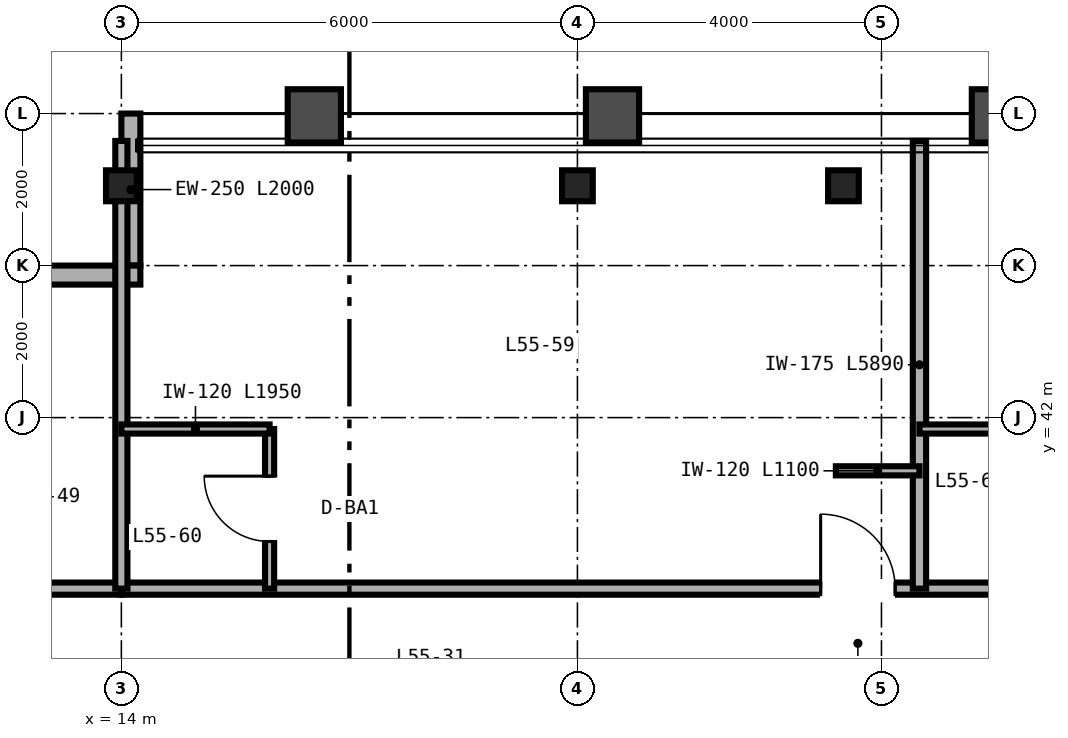
"""IFC4 building model, lengths in metres.
Left out: names, types, materials, properties, quantities, classifications, styles, units other than length and angle.
Written with IfcOpenShell. Run it as: python <this file> out.ifc"""

import sys

from ifc_helpers import new_model, si_unit, direction, frame, frame_2d, origin, origin_2d, place, context, subcontext, project, spatial, rectangle, i_section, extrude, source, transform, mapped, element, fill, save


model = new_model("IFC4")
c1 = context("Model", 3, precision=1e-05, world=origin(), true_north=direction((0.0, 1.0)))
c2 = subcontext(c1, "Body", "Model", "MODEL_VIEW")
j1 = project(units=[si_unit("LENGTHUNIT", "METRE"), si_unit("PLANEANGLEUNIT", "RADIAN")], contexts=[c1])
p1 = place(None, origin())
s1 = spatial("IfcSite", under=j1, at=p1, CompositionType="ELEMENT")
p2 = place(p1, origin())
s2 = spatial("IfcBuilding", under=s1, at=p2, CompositionType="ELEMENT")
p3 = place(p2, frame((0.0, 0.0, 217.2)))
s3 = spatial("IfcBuildingStorey", under=s2, at=p3, CompositionType="ELEMENT", Elevation=217.2)
m1 = source(origin(), c2, "Body", "SweptSolid", [
    extrude(i_section(OverallWidth=0.404, OverallDepth=0.407, WebThickness=0.027, FlangeThickness=0.044, FilletRadius=0.025, at=origin_2d()), origin(), (0.0, 0.0, 1.0), 3.28),
])
for number, where, z_axis, x_axis in (
    (1, (14.0, 45.05, 0.0), (0.0, 0.0, 1.0), (1.0, 0.0, 0.0)),
    (2, (20.0, 45.05, 0.0), (0.0, 0.0, 1.0), (1.0, 0.0, 0.0)),
    (3, (23.5, 45.05, 0.0), (0.0, 0.0, 1.0), (1.0, 0.0, 0.0)),
):
    element("IfcColumn", number, at=place(p3, frame(where, z_axis=z_axis, x_axis=x_axis)), inside=s3, PredefinedType="COLUMN", context=c2, shape_type="MappedRepresentation", body=[
        mapped(m1, transform((0.0, 0.0, 0.0), scale=1.0)),
    ])
p4 = place(p3, frame((14.125, 46.0, 0.0), z_axis=(0.0, 0.0, 1.0), x_axis=(0.0, -1.0, 0.0)))
e4 = element("IfcWall", 4, at=p4, inside=s3, PredefinedType="SOLIDWALL", context=c2, shape_type="SweptSolid", body=[
    extrude(rectangle(XDim=2.0, YDim=0.25, at=frame_2d((1.0, 0.0))), origin(), (0.0, 0.0, 1.0), 2.587),
])
p5 = place(p3, frame((14.25, 43.875, 0.0), z_axis=(0.0, 0.0, 1.0), x_axis=(-1.0, 0.0, 0.0)))
e5 = element("IfcWall", 5, at=p5, inside=s3, PredefinedType="SOLIDWALL", context=c2, shape_type="SweptSolid", body=[
    extrude(rectangle(XDim=2.0, YDim=0.25, at=frame_2d((1.0, 0.0))), origin(), (0.0, 0.0, 1.0), 3.28),
])
p6 = place(p3, frame((10.0, 39.75, 0.0), z_axis=(0.0, 0.0, 1.0), x_axis=(1.0, 0.0, 0.0)))
e6 = element("IfcWall", 6, at=p6, inside=s3, PredefinedType="PARTITIONING", context=c2, shape_type="SweptSolid", body=[
    extrude(rectangle(XDim=4.0, YDim=0.16, at=frame_2d((2.0, 0.0))), origin(), (0.0, 0.0, 1.0), 3.28),
])
p7 = place(p6, frame((1.52, 0.0, 0.0)))
e7 = element("IfcOpeningElement", 7, at=p7, cuts=e6, PredefinedType="OPENING", context=c2, shape_type="SweptSolid", body=[
    extrude(rectangle(XDim=0.96, YDim=2.15, at=frame_2d((0.48, 1.075))), frame((0.0, 0.09, 0.0), z_axis=(0.0, -1.0, 0.0), x_axis=(1.0, 0.0, 0.0)), (0.0, 0.0, 1.0), 0.18),
])
p8 = place(p3, frame((14.0, 39.75, 0.0), z_axis=(0.0, 0.0, 1.0), x_axis=(1.0, 0.0, 0.0)))
e8 = element("IfcWall", 8, at=p8, inside=s3, PredefinedType="PARTITIONING", context=c2, shape_type="SweptSolid", body=[
    extrude(rectangle(XDim=36.0, YDim=0.16, at=frame_2d((18.0, 0.0))), origin(), (0.0, 0.0, 1.0), 2.823),
])
p9 = place(p8, frame((9.2, 0.0, 0.0)))
e9 = element("IfcOpeningElement", 9, at=p9, cuts=e8, PredefinedType="OPENING", context=c2, shape_type="SweptSolid", body=[
    extrude(rectangle(XDim=0.98, YDim=2.2, at=frame_2d((0.49, 1.1))), frame((0.0, 0.09, 0.0), z_axis=(0.0, -1.0, 0.0), x_axis=(1.0, 0.0, 0.0)), (0.0, 0.0, 1.0), 0.18),
])
p10 = place(p8, frame((19.2, 0.0, 0.0)))
e10 = element("IfcOpeningElement", 10, at=p10, cuts=e8, PredefinedType="OPENING", context=c2, shape_type="SweptSolid", body=[
    extrude(rectangle(XDim=0.98, YDim=2.2, at=frame_2d((0.49, 1.1))), frame((0.0, 0.09, 0.0), z_axis=(0.0, -1.0, 0.0), x_axis=(1.0, 0.0, 0.0)), (0.0, 0.0, 1.0), 0.18),
])
p11 = place(p8, frame((24.52, 0.0, 0.0)))
e11 = element("IfcOpeningElement", 11, at=p11, cuts=e8, PredefinedType="OPENING", context=c2, shape_type="SweptSolid", body=[
    extrude(rectangle(XDim=0.96, YDim=2.15, at=frame_2d((0.48, 1.075))), frame((0.0, 0.09, 0.0), z_axis=(0.0, -1.0, 0.0), x_axis=(1.0, 0.0, 0.0)), (0.0, 0.0, 1.0), 0.18),
])
p12 = place(p8, frame((34.74, 0.0, 0.0)))
e12 = element("IfcOpeningElement", 12, at=p12, cuts=e8, PredefinedType="OPENING", context=c2, shape_type="SweptSolid", body=[
    extrude(rectangle(XDim=0.94, YDim=2.15, at=frame_2d((0.47, 1.075))), frame((0.0, 0.09, 0.0), z_axis=(0.0, -1.0, 0.0), x_axis=(1.0, 0.0, 0.0)), (0.0, 0.0, 1.0), 0.18),
])
p13 = place(p3, frame((14.0, 39.75, 0.0), z_axis=(0.0, 0.0, 1.0), x_axis=(0.0, 1.0, 0.0)))
e13 = element("IfcWall", 13, at=p13, inside=s3, PredefinedType="PARTITIONING", context=c2, shape_type="SweptSolid", body=[
    extrude(rectangle(XDim=5.89, YDim=0.16, at=frame_2d((2.945, 0.0))), origin(), (0.0, 0.0, 1.0), 2.587),
])
p14 = place(p3, frame((24.5, 39.75, 0.0), z_axis=(0.0, 0.0, 1.0), x_axis=(0.0, 1.0, 0.0)))
e14 = element("IfcWall", 14, at=p14, inside=s3, PredefinedType="PARTITIONING", context=c2, shape_type="SweptSolid", body=[
    extrude(rectangle(XDim=5.89, YDim=0.175, at=frame_2d((2.945, 0.0))), origin(), (0.0, 0.0, 1.0), 2.36),
])
p15 = place(p3, frame((15.95, 39.75, 0.0), z_axis=(0.0, 0.0, 1.0), x_axis=(0.0, 1.0, 0.0)))
e15 = element("IfcWall", 15, at=p15, inside=s3, PredefinedType="PARTITIONING", context=c2, shape_type="SweptSolid", body=[
    extrude(rectangle(XDim=2.1, YDim=0.12, at=frame_2d((1.05, 0.0))), origin(), (0.0, 0.0, 1.0), 3.28),
])
p16 = place(p15, frame((0.62, 0.0, 0.0)))
e16 = element("IfcOpeningElement", 16, at=p16, cuts=e15, PredefinedType="OPENING", context=c2, shape_type="SweptSolid", body=[
    extrude(rectangle(XDim=0.86, YDim=2.1, at=frame_2d((0.43, 1.05))), frame((0.0, 0.07, 0.0), z_axis=(0.0, -1.0, 0.0), x_axis=(1.0, 0.0, 0.0)), (0.0, 0.0, 1.0), 0.14),
])
p17 = place(p3, frame((14.0, 41.85, 0.0), z_axis=(0.0, 0.0, 1.0), x_axis=(1.0, 0.0, 0.0)))
e17 = element("IfcWall", 17, at=p17, inside=s3, PredefinedType="PARTITIONING", context=c2, shape_type="SweptSolid", body=[
    extrude(rectangle(XDim=1.95, YDim=0.12, at=frame_2d((0.975, 0.0))), origin(), (0.0, 0.0, 1.0), 3.28),
])
p18 = place(p3, frame((23.4, 41.3, 0.0), z_axis=(0.0, 0.0, 1.0), x_axis=(1.0, 0.0, 0.0)))
e18 = element("IfcWall", 18, at=p18, inside=s3, PredefinedType="PARTITIONING", context=c2, shape_type="SweptSolid", body=[
    extrude(rectangle(XDim=1.1, YDim=0.12, at=frame_2d((0.55, 0.0))), origin(), (0.0, 0.0, 1.0), 2.823),
])
p19 = place(p3, frame((24.5, 41.85, 0.0), z_axis=(0.0, 0.0, 1.0), x_axis=(1.0, 0.0, 0.0)))
e19 = element("IfcWall", 19, at=p19, inside=s3, PredefinedType="PARTITIONING", context=c2, shape_type="SweptSolid", body=[
    extrude(rectangle(XDim=1.95, YDim=0.12, at=frame_2d((0.975, 0.0))), origin(), (0.0, 0.0, 1.0), 3.28),
])
m2 = source(origin(), c2, "Body", "SweptSolid", [
    extrude(rectangle(XDim=0.86, YDim=2.1, at=frame_2d((0.43, 1.05))), frame((0.0, 0.025, 0.0), z_axis=(0.0, -1.0, 0.0), x_axis=(1.0, 0.0, 0.0)), (0.0, 0.0, 1.0), 0.05),
])
p20 = place(p16, origin())
e20 = element("IfcDoor", 20, at=p20, inside=s3, OperationType="SINGLE_SWING_RIGHT", PredefinedType="DOOR", context=c2, shape_type="MappedRepresentation", body=[
    mapped(m2, transform((0.0, 0.0, 0.0), scale=1.0)),
])
fill(e16, e20)
m3 = source(origin(), c2, "Body", "SweptSolid", [
    extrude(rectangle(XDim=0.98, YDim=2.2, at=frame_2d((0.49, 1.1))), frame((0.0, 0.025, 0.0), z_axis=(0.0, -1.0, 0.0), x_axis=(1.0, 0.0, 0.0)), (0.0, 0.0, 1.0), 0.05),
])
p21 = place(p9, origin())
e21 = element("IfcDoor", 21, at=p21, inside=s3, OperationType="SINGLE_SWING_LEFT", PredefinedType="DOOR", context=c2, shape_type="MappedRepresentation", body=[
    mapped(m3, transform((0.0, 0.0, 0.0), scale=1.0)),
])
fill(e9, e21)
save(model, sys.argv[1])
